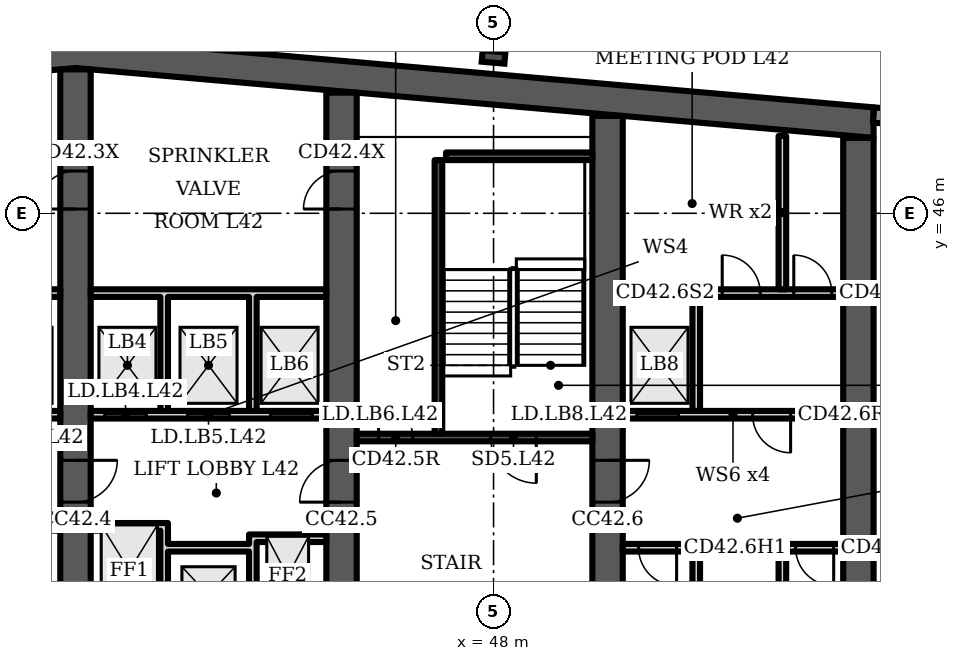
"""IFC4 building model, lengths in metres.
Left out: names, types, materials, properties, quantities, classifications, styles, units other than length and angle.
Written with IfcOpenShell. Run it as: python <this file> out.ifc"""

import sys

from ifc_helpers import new_model, si_unit, direction, frame, frame_2d, origin, origin_2d, place, context, subcontext, project, spatial, polyline, rectangle, i_section, outline, extrude, element, fill, save


model = new_model("IFC4")
c1 = context("Model", 3, precision=1e-05, world=origin(), true_north=direction((0.0, 1.0)))
c2 = subcontext(c1, "Body", "Model", "MODEL_VIEW")
j1 = project(units=[si_unit("LENGTHUNIT", "METRE"), si_unit("PLANEANGLEUNIT", "RADIAN")], contexts=[c1])
p1 = place(None, origin())
s1 = spatial("IfcSite", under=j1, at=p1, CompositionType="ELEMENT")
p2 = place(p1, origin())
s2 = spatial("IfcBuilding", under=s1, at=p2, CompositionType="ELEMENT")
p3 = place(p2, frame((0.0, 0.0, 173.5)))
s3 = spatial("IfcBuildingStorey", under=s2, at=p3, CompositionType="ELEMENT", Elevation=173.5)
p4 = place(p3, origin())
e1 = element("IfcWall", 1, at=p4, inside=s3, PredefinedType="SHEAR", context=c2, shape_type="SweptSolid", body=[
    extrude(outline(polyline([(16.0, 47.984), (37.0, 49.822), (58.0, 47.984), (58.0, 48.787), (37.0, 50.625), (16.0, 48.787), (16.0, 47.984)])), origin(), (0.0, 0.0, 1.0), 3.6),
])
p5 = place(p3, frame((37.0, 34.8, 0.0), z_axis=(0.0, 0.0, 1.0), x_axis=(0.0, 1.0, 0.0)))
e2 = element("IfcWall", 2, at=p5, inside=s3, PredefinedType="SHEAR", context=c2, shape_type="SweptSolid", body=[
    extrude(rectangle(XDim=14.987, YDim=0.8, at=frame_2d((7.493, 0.0))), origin(), (0.0, 0.0, 1.0), 3.6),
])
p6 = place(p5, frame((11.312, 0.0, 0.0)))
e3 = element("IfcOpeningElement", 3, at=p6, cuts=e2, PredefinedType="OPENING", context=c2, shape_type="SweptSolid", body=[
    extrude(rectangle(XDim=1.0, YDim=2.1, at=frame_2d((0.5, 1.05))), frame((0.0, 0.41, 0.0), z_axis=(0.0, -1.0, 0.0), x_axis=(1.0, 0.0, 0.0)), (0.0, 0.0, 1.0), 0.82),
])
p7 = place(p5, frame((3.6, 0.0, 0.0)))
e4 = element("IfcOpeningElement", 4, at=p7, cuts=e2, PredefinedType="OPENING", context=c2, shape_type="SweptSolid", body=[
    extrude(rectangle(XDim=1.1, YDim=2.1, at=frame_2d((0.55, 1.05))), frame((0.0, 0.41, 0.0), z_axis=(0.0, -1.0, 0.0), x_axis=(1.0, 0.0, 0.0)), (0.0, 0.0, 1.0), 0.82),
])
p8 = place(p3, frame((44.0, 34.8, 0.0), z_axis=(0.0, 0.0, 1.0), x_axis=(0.0, 1.0, 0.0)))
e5 = element("IfcWall", 5, at=p8, inside=s3, PredefinedType="SHEAR", context=c2, shape_type="SweptSolid", body=[
    extrude(rectangle(XDim=14.374, YDim=0.8, at=frame_2d((7.187, 0.0))), origin(), (0.0, 0.0, 1.0), 3.6),
])
p9 = place(p8, frame((11.312, 0.0, 0.0)))
e6 = element("IfcOpeningElement", 6, at=p9, cuts=e5, PredefinedType="OPENING", context=c2, shape_type="SweptSolid", body=[
    extrude(rectangle(XDim=1.0, YDim=2.1, at=frame_2d((0.5, 1.05))), frame((0.0, 0.41, 0.0), z_axis=(0.0, -1.0, 0.0), x_axis=(1.0, 0.0, 0.0)), (0.0, 0.0, 1.0), 0.82),
])
p10 = place(p8, frame((3.6, 0.0, 0.0)))
e7 = element("IfcOpeningElement", 7, at=p10, cuts=e5, PredefinedType="OPENING", context=c2, shape_type="SweptSolid", body=[
    extrude(rectangle(XDim=1.1, YDim=2.1, at=frame_2d((0.55, 1.05))), frame((0.0, 0.41, 0.0), z_axis=(0.0, -1.0, 0.0), x_axis=(1.0, 0.0, 0.0)), (0.0, 0.0, 1.0), 0.82),
])
p11 = place(p3, frame((51.0, 34.8, 0.0), z_axis=(0.0, 0.0, 1.0), x_axis=(0.0, 1.0, 0.0)))
e8 = element("IfcWall", 8, at=p11, inside=s3, PredefinedType="SHEAR", context=c2, shape_type="SweptSolid", body=[
    extrude(rectangle(XDim=13.762, YDim=0.8, at=frame_2d((6.881, 0.0))), origin(), (0.0, 0.0, 1.0), 3.6),
])
p12 = place(p11, frame((3.6, 0.0, 0.0)))
e9 = element("IfcOpeningElement", 9, at=p12, cuts=e8, PredefinedType="OPENING", context=c2, shape_type="SweptSolid", body=[
    extrude(rectangle(XDim=1.1, YDim=2.1, at=frame_2d((0.55, 1.05))), frame((0.0, 0.41, 0.0), z_axis=(0.0, -1.0, 0.0), x_axis=(1.0, 0.0, 0.0)), (0.0, 0.0, 1.0), 0.82),
])
p13 = place(p3, frame((57.6, 34.8, 0.0), z_axis=(0.0, 0.0, 1.0), x_axis=(0.0, 1.0, 0.0)))
e10 = element("IfcWall", 10, at=p13, inside=s3, PredefinedType="SHEAR", context=c2, shape_type="SweptSolid", body=[
    extrude(rectangle(XDim=13.184, YDim=0.8, at=frame_2d((6.592, 0.0))), origin(), (0.0, 0.0, 1.0), 3.6),
])
p14 = place(p3, frame((48.0, 50.112, 0.0), z_axis=(0.0, 0.0, 1.0), x_axis=(0.087156, 0.996198, 0.0)))
e11 = element("IfcColumn", 11, at=p14, inside=s3, PredefinedType="COLUMN", context=c2, shape_type="SweptSolid", body=[
    extrude(i_section(OverallWidth=0.3, OverallDepth=0.6, WebThickness=0.015, FlangeThickness=0.03, FilletRadius=0.027, at=origin_2d()), origin(), (0.0, 0.0, 1.0), 3.6),
])
p15 = place(p3, frame((60.983, 48.326, 0.0), z_axis=(0.0, 0.0, 1.0), x_axis=(-0.996194, 0.087168, 0.0)))
e12 = element("IfcWall", 12, at=p15, inside=s3, PredefinedType="SOLIDWALL", context=c2, shape_type="SweptSolid", body=[
    extrude(rectangle(XDim=2.994, YDim=0.4, at=frame_2d((1.497, 0.0))), origin(), (0.0, 0.0, 1.0), 3.2),
])
p16 = place(p3, frame((30.4, 40.7, 0.0), z_axis=(0.0, 0.0, 1.0), x_axis=(1.0, 0.0, 0.0)))
e13 = element("IfcWall", 13, at=p16, inside=s3, PredefinedType="PARTITIONING", context=c2, shape_type="SweptSolid", body=[
    extrude(rectangle(XDim=6.2, YDim=0.2, at=frame_2d((3.1, 0.0))), origin(), (0.0, 0.0, 1.0), 3.2),
])
p17 = place(p16, frame((0.367, 0.0, 0.0)))
e14 = element("IfcOpeningElement", 14, at=p17, cuts=e13, PredefinedType="OPENING", context=c2, shape_type="SweptSolid", body=[
    extrude(rectangle(XDim=1.1, YDim=2.1, at=frame_2d((0.55, 1.05))), frame((0.0, 0.11, 0.0), z_axis=(0.0, -1.0, 0.0), x_axis=(1.0, 0.0, 0.0)), (0.0, 0.0, 1.0), 0.22),
])
p18 = place(p16, frame((2.55, 0.0, 0.0)))
e15 = element("IfcOpeningElement", 15, at=p18, cuts=e13, PredefinedType="OPENING", context=c2, shape_type="SweptSolid", body=[
    extrude(rectangle(XDim=1.1, YDim=2.1, at=frame_2d((0.55, 1.05))), frame((0.0, 0.11, 0.0), z_axis=(0.0, -1.0, 0.0), x_axis=(1.0, 0.0, 0.0)), (0.0, 0.0, 1.0), 0.22),
])
p19 = place(p16, frame((4.733, 0.0, 0.0)))
e16 = element("IfcOpeningElement", 16, at=p19, cuts=e13, PredefinedType="OPENING", context=c2, shape_type="SweptSolid", body=[
    extrude(rectangle(XDim=1.1, YDim=2.1, at=frame_2d((0.55, 1.05))), frame((0.0, 0.11, 0.0), z_axis=(0.0, -1.0, 0.0), x_axis=(1.0, 0.0, 0.0)), (0.0, 0.0, 1.0), 0.22),
])
p20 = place(p3, frame((0.0, 0.0, -0.0)))
e17 = element("IfcWall", 17, at=p20, inside=s3, PredefinedType="PARTITIONING", context=c2, shape_type="SweptSolid", body=[
    extrude(outline(polyline([(34.567, 37.85), (34.767, 37.85), (36.6, 37.85), (36.6, 37.65), (34.767, 37.65), (34.767, 34.8), (34.567, 34.8), (34.567, 37.85)])), origin(), (0.0, 0.0, 1.0), 3.2),
])
p21 = place(p3, frame((0.0, 0.0, -0.0)))
e18 = element("IfcWall", 18, at=p21, inside=s3, PredefinedType="PARTITIONING", context=c2, shape_type="SweptSolid", body=[
    extrude(outline(polyline([(32.433, 40.8), (32.233, 40.8), (32.233, 43.8), (30.4, 43.8), (30.4, 44.0), (36.6, 44.0), (36.6, 43.8), (34.767, 43.8), (34.767, 40.8), (34.567, 40.8), (34.567, 43.8), (32.433, 43.8), (32.433, 40.8)])), origin(), (0.0, 0.0, 1.0), 3.2),
])
p22 = place(p3, frame((37.4, 40.7, 0.0), z_axis=(0.0, 0.0, 1.0), x_axis=(1.0, 0.0, 0.0)))
e19 = element("IfcWall", 19, at=p22, inside=s3, PredefinedType="PARTITIONING", context=c2, shape_type="SweptSolid", body=[
    extrude(rectangle(XDim=6.2, YDim=0.2, at=frame_2d((3.1, 0.0))), origin(), (0.0, 0.0, 1.0), 3.2),
])
p23 = place(p22, frame((0.367, 0.0, 0.0)))
e20 = element("IfcOpeningElement", 20, at=p23, cuts=e19, PredefinedType="OPENING", context=c2, shape_type="SweptSolid", body=[
    extrude(rectangle(XDim=1.1, YDim=2.1, at=frame_2d((0.55, 1.05))), frame((0.0, 0.11, 0.0), z_axis=(0.0, -1.0, 0.0), x_axis=(1.0, 0.0, 0.0)), (0.0, 0.0, 1.0), 0.22),
])
p24 = place(p22, frame((2.55, 0.0, 0.0)))
e21 = element("IfcOpeningElement", 21, at=p24, cuts=e19, PredefinedType="OPENING", context=c2, shape_type="SweptSolid", body=[
    extrude(rectangle(XDim=1.1, YDim=2.1, at=frame_2d((0.55, 1.05))), frame((0.0, 0.11, 0.0), z_axis=(0.0, -1.0, 0.0), x_axis=(1.0, 0.0, 0.0)), (0.0, 0.0, 1.0), 0.22),
])
p25 = place(p22, frame((4.733, 0.0, 0.0)))
e22 = element("IfcOpeningElement", 22, at=p25, cuts=e19, PredefinedType="OPENING", context=c2, shape_type="SweptSolid", body=[
    extrude(rectangle(XDim=1.1, YDim=2.1, at=frame_2d((0.55, 1.05))), frame((0.0, 0.11, 0.0), z_axis=(0.0, -1.0, 0.0), x_axis=(1.0, 0.0, 0.0)), (0.0, 0.0, 1.0), 0.22),
])
p26 = place(p3, frame((0.0, 0.0, -0.0)))
e23 = element("IfcWall", 23, at=p26, inside=s3, PredefinedType="PARTITIONING", context=c2, shape_type="SweptSolid", body=[
    extrude(outline(polyline([(41.567, 37.1), (39.433, 37.1), (39.433, 34.8), (39.233, 34.8), (39.233, 37.65), (37.4, 37.65), (37.4, 37.85), (39.233, 37.85), (39.433, 37.85), (39.433, 37.3), (41.567, 37.3), (41.567, 37.55), (41.767, 37.55), (43.6, 37.55), (43.6, 37.35), (41.767, 37.35), (41.767, 34.8), (41.567, 34.8), (41.567, 37.1)])), origin(), (0.0, 0.0, 1.0), 3.2),
])
p27 = place(p3, frame((0.0, 0.0, -0.0)))
e24 = element("IfcWall", 24, at=p27, inside=s3, PredefinedType="PARTITIONING", context=c2, shape_type="SweptSolid", body=[
    extrude(outline(polyline([(39.433, 40.8), (39.233, 40.8), (39.233, 43.8), (37.4, 43.8), (37.4, 44.0), (43.6, 44.0), (43.6, 43.8), (41.767, 43.8), (41.767, 40.8), (41.567, 40.8), (41.567, 43.8), (39.433, 43.8), (39.433, 40.8)])), origin(), (0.0, 0.0, 1.0), 3.2),
])
p28 = place(p3, frame((44.4, 40.1, 0.0), z_axis=(0.0, 0.0, 1.0), x_axis=(1.0, 0.0, 0.0)))
e25 = element("IfcWall", 25, at=p28, inside=s3, PredefinedType="SHEAR", context=c2, shape_type="SweptSolid", body=[
    extrude(rectangle(XDim=6.2, YDim=0.2, at=frame_2d((3.1, 0.0))), origin(), (0.0, 0.0, 1.0), 3.2),
])
p29 = place(p28, frame((3.525, 0.0, 0.0)))
e26 = element("IfcOpeningElement", 26, at=p29, cuts=e25, PredefinedType="OPENING", context=c2, shape_type="SweptSolid", body=[
    extrude(rectangle(XDim=1.2, YDim=2.1, at=frame_2d((0.6, 1.05))), frame((0.0, 0.11, 0.0), z_axis=(0.0, -1.0, 0.0), x_axis=(1.0, 0.0, 0.0)), (0.0, 0.0, 1.0), 0.22),
])
p30 = place(p28, frame((0.575, 0.0, 0.0)))
e27 = element("IfcOpeningElement", 27, at=p30, cuts=e25, PredefinedType="OPENING", context=c2, shape_type="SweptSolid", body=[
    extrude(rectangle(XDim=0.9, YDim=2.1, at=frame_2d((0.45, 1.05))), frame((0.0, 0.11, 0.0), z_axis=(0.0, -1.0, 0.0), x_axis=(1.0, 0.0, 0.0)), (0.0, 0.0, 1.0), 0.22),
])
p31 = place(p3, frame((46.55, 40.2, 0.0), z_axis=(0.0, 0.0, 1.0), x_axis=(0.0, 1.0, 0.0)))
e28 = element("IfcWall", 28, at=p31, inside=s3, PredefinedType="SHEAR", context=c2, shape_type="SweptSolid", body=[
    extrude(rectangle(XDim=7.2, YDim=0.2, at=frame_2d((3.6, 0.0))), origin(), (0.0, 0.0, 1.0), 3.2),
])
p32 = place(p3, frame((46.75, 47.5, 0.0), z_axis=(0.0, 0.0, 1.0), x_axis=(1.0, 0.0, 0.0)))
e29 = element("IfcWall", 29, at=p32, inside=s3, PredefinedType="SHEAR", context=c2, shape_type="SweptSolid", body=[
    extrude(rectangle(XDim=3.85, YDim=0.2, at=frame_2d((1.925, 0.0))), origin(), (0.0, 0.0, 1.0), 3.2),
])
p33 = place(p3, frame((51.4, 37.2, 0.0), z_axis=(0.0, 0.0, 1.0), x_axis=(1.0, 0.0, 0.0)))
e30 = element("IfcWall", 30, at=p33, inside=s3, PredefinedType="PARTITIONING", context=c2, shape_type="SweptSolid", body=[
    extrude(rectangle(XDim=1.833, YDim=0.2, at=frame_2d((0.917, 0.0))), origin(), (0.0, 0.0, 1.0), 3.2),
])
p34 = place(p33, frame((0.417, 0.0, 0.0)))
e31 = element("IfcOpeningElement", 31, at=p34, cuts=e30, PredefinedType="OPENING", context=c2, shape_type="SweptSolid", body=[
    extrude(rectangle(XDim=1.0, YDim=2.1, at=frame_2d((0.5, 1.05))), frame((0.0, 0.11, 0.0), z_axis=(0.0, -1.0, 0.0), x_axis=(1.0, 0.0, 0.0)), (0.0, 0.0, 1.0), 0.22),
])
p35 = place(p3, frame((55.7, 37.2, 0.0), z_axis=(0.0, 0.0, 1.0), x_axis=(1.0, 0.0, 0.0)))
e32 = element("IfcWall", 32, at=p35, inside=s3, PredefinedType="PARTITIONING", context=c2, shape_type="SweptSolid", body=[
    extrude(rectangle(XDim=1.5, YDim=0.2, at=frame_2d((0.75, 0.0))), origin(), (0.0, 0.0, 1.0), 3.2),
])
p36 = place(p35, frame((0.25, 0.0, 0.0)))
e33 = element("IfcOpeningElement", 33, at=p36, cuts=e32, PredefinedType="OPENING", context=c2, shape_type="SweptSolid", body=[
    extrude(rectangle(XDim=1.0, YDim=2.1, at=frame_2d((0.5, 1.05))), frame((0.0, 0.11, 0.0), z_axis=(0.0, -1.0, 0.0), x_axis=(1.0, 0.0, 0.0)), (0.0, 0.0, 1.0), 0.22),
])
p37 = place(p3, frame((51.4, 40.7, 0.0), z_axis=(0.0, 0.0, 1.0), x_axis=(1.0, 0.0, 0.0)))
e34 = element("IfcWall", 34, at=p37, inside=s3, PredefinedType="PARTITIONING", context=c2, shape_type="SweptSolid", body=[
    extrude(rectangle(XDim=5.8, YDim=0.2, at=frame_2d((2.9, 0.0))), origin(), (0.0, 0.0, 1.0), 3.2),
])
p38 = place(p37, frame((0.367, 0.0, 0.0)))
e35 = element("IfcOpeningElement", 35, at=p38, cuts=e34, PredefinedType="OPENING", context=c2, shape_type="SweptSolid", body=[
    extrude(rectangle(XDim=1.1, YDim=2.1, at=frame_2d((0.55, 1.05))), frame((0.0, 0.11, 0.0), z_axis=(0.0, -1.0, 0.0), x_axis=(1.0, 0.0, 0.0)), (0.0, 0.0, 1.0), 0.22),
])
p39 = place(p37, frame((3.417, 0.0, 0.0)))
e36 = element("IfcOpeningElement", 36, at=p39, cuts=e34, PredefinedType="OPENING", context=c2, shape_type="SweptSolid", body=[
    extrude(rectangle(XDim=1.0, YDim=2.1, at=frame_2d((0.5, 1.05))), frame((0.0, 0.11, 0.0), z_axis=(0.0, -1.0, 0.0), x_axis=(1.0, 0.0, 0.0)), (0.0, 0.0, 1.0), 0.22),
])
p40 = place(p3, frame((51.4, 43.9, 0.0), z_axis=(0.0, 0.0, 1.0), x_axis=(1.0, 0.0, 0.0)))
e37 = element("IfcWall", 37, at=p40, inside=s3, PredefinedType="PARTITIONING", context=c2, shape_type="SweptSolid", body=[
    extrude(rectangle(XDim=5.8, YDim=0.2, at=frame_2d((2.9, 0.0))), origin(), (0.0, 0.0, 1.0), 3.2),
])
p41 = place(p40, frame((2.617, 0.0, 0.0)))
e38 = element("IfcOpeningElement", 38, at=p41, cuts=e37, PredefinedType="OPENING", context=c2, shape_type="SweptSolid", body=[
    extrude(rectangle(XDim=1.0, YDim=2.1, at=frame_2d((0.5, 1.05))), frame((0.0, 0.11, 0.0), z_axis=(0.0, -1.0, 0.0), x_axis=(1.0, 0.0, 0.0)), (0.0, 0.0, 1.0), 0.22),
])
p42 = place(p40, frame((4.5, 0.0, 0.0)))
e39 = element("IfcOpeningElement", 39, at=p42, cuts=e37, PredefinedType="OPENING", context=c2, shape_type="SweptSolid", body=[
    extrude(rectangle(XDim=1.0, YDim=2.1, at=frame_2d((0.5, 1.05))), frame((0.0, 0.11, 0.0), z_axis=(0.0, -1.0, 0.0), x_axis=(1.0, 0.0, 0.0)), (0.0, 0.0, 1.0), 0.22),
])
p43 = place(p3, frame((0.0, 0.0, -0.0)))
e40 = element("IfcWall", 40, at=p43, inside=s3, PredefinedType="PARTITIONING", context=c2, shape_type="SweptSolid", body=[
    extrude(outline(polyline([(53.233, 34.8), (53.233, 37.3), (53.433, 37.3), (53.433, 34.8), (53.233, 34.8)])), origin(), (0.0, 0.0, 1.0), 3.2),
])
p44 = place(p3, frame((0.0, 0.0, -0.0)))
e41 = element("IfcWall", 41, at=p44, inside=s3, PredefinedType="PARTITIONING", context=c2, shape_type="SweptSolid", body=[
    extrude(outline(polyline([(55.5, 34.8), (55.5, 37.3), (55.7, 37.3), (55.7, 34.8), (55.5, 34.8)])), origin(), (0.0, 0.0, 1.0), 3.2),
])
p45 = place(p3, frame((0.0, 0.0, -0.0)))
e42 = element("IfcWall", 42, at=p45, inside=s3, PredefinedType="PARTITIONING", context=c2, shape_type="SweptSolid", body=[
    extrude(outline(polyline([(53.433, 40.8), (53.433, 43.8), (53.233, 43.8), (53.233, 40.8), (53.433, 40.8)])), origin(), (0.0, 0.0, 1.0), 3.2),
])
p46 = place(p3, frame((55.6, 44.0, 0.0), z_axis=(0.0, 0.0, 1.0), x_axis=(0.0, 1.0, 0.0)))
e43 = element("IfcWall", 43, at=p46, inside=s3, PredefinedType="PARTITIONING", context=c2, shape_type="SweptSolid", body=[
    extrude(rectangle(XDim=4.034, YDim=0.2, at=frame_2d((2.017, 0.0))), origin(), (0.0, 0.0, 1.0), 3.2),
])
p47 = place(p6, origin())
e44 = element("IfcDoor", 44, at=p47, inside=s3, OperationType="SINGLE_SWING_LEFT", PredefinedType="DOOR", context=c2, shape_type="SweptSolid", body=[
    extrude(rectangle(XDim=1.0, YDim=2.1, at=frame_2d((0.5, 1.05))), frame((0.0, 0.4, 0.0), z_axis=(0.0, -1.0, 0.0), x_axis=(1.0, 0.0, 0.0)), (0.0, 0.0, 1.0), 0.8),
])
fill(e3, e44)
p48 = place(p23, origin())
e45 = element("IfcDoor", 45, at=p48, inside=s3, OperationType="DOUBLE_DOOR_SLIDING", PredefinedType="DOOR", context=c2, shape_type="SweptSolid", body=[
    extrude(rectangle(XDim=1.1, YDim=2.1, at=frame_2d((0.55, 1.05))), frame((0.0, 0.025, 0.0), z_axis=(0.0, -1.0, 0.0), x_axis=(1.0, 0.0, 0.0)), (0.0, 0.0, 1.0), 0.05),
])
fill(e20, e45)
p49 = place(p24, origin())
e46 = element("IfcDoor", 46, at=p49, inside=s3, OperationType="DOUBLE_DOOR_SLIDING", PredefinedType="DOOR", context=c2, shape_type="SweptSolid", body=[
    extrude(rectangle(XDim=1.1, YDim=2.1, at=frame_2d((0.55, 1.05))), frame((0.0, 0.025, 0.0), z_axis=(0.0, -1.0, 0.0), x_axis=(1.0, 0.0, 0.0)), (0.0, 0.0, 1.0), 0.05),
])
fill(e21, e46)
p50 = place(p25, origin())
e47 = element("IfcDoor", 47, at=p50, inside=s3, OperationType="DOUBLE_DOOR_SLIDING", PredefinedType="DOOR", context=c2, shape_type="SweptSolid", body=[
    extrude(rectangle(XDim=1.1, YDim=2.1, at=frame_2d((0.55, 1.05))), frame((0.0, 0.025, 0.0), z_axis=(0.0, -1.0, 0.0), x_axis=(1.0, 0.0, 0.0)), (0.0, 0.0, 1.0), 0.05),
])
fill(e22, e47)
p51 = place(p9, origin())
e48 = element("IfcDoor", 48, at=p51, inside=s3, OperationType="SINGLE_SWING_LEFT", PredefinedType="DOOR", context=c2, shape_type="SweptSolid", body=[
    extrude(rectangle(XDim=1.0, YDim=2.1, at=frame_2d((0.5, 1.05))), frame((0.0, 0.4, 0.0), z_axis=(0.0, -1.0, 0.0), x_axis=(1.0, 0.0, 0.0)), (0.0, 0.0, 1.0), 0.8),
])
fill(e6, e48)
p52 = place(p29, origin())
e49 = element("IfcDoor", 49, at=p52, inside=s3, OperationType="SINGLE_SWING_RIGHT", PredefinedType="DOOR", context=c2, shape_type="SweptSolid", body=[
    extrude(rectangle(XDim=1.2, YDim=2.1, at=frame_2d((0.6, 1.05))), frame((0.0, 0.025, 0.0), z_axis=(0.0, -1.0, 0.0), x_axis=(1.0, 0.0, 0.0)), (0.0, 0.0, 1.0), 0.05),
])
fill(e26, e49)
p53 = place(p30, origin())
e50 = element("IfcDoor", 50, at=p53, inside=s3, OperationType="SINGLE_SWING_LEFT", PredefinedType="DOOR", context=c2, shape_type="SweptSolid", body=[
    extrude(rectangle(XDim=0.9, YDim=2.1, at=frame_2d((0.45, 1.05))), frame((0.0, 0.025, 0.0), z_axis=(0.0, -1.0, 0.0), x_axis=(1.0, 0.0, 0.0)), (0.0, 0.0, 1.0), 0.05),
])
fill(e27, e50)
p54 = place(p34, origin())
e51 = element("IfcDoor", 51, at=p54, inside=s3, OperationType="SINGLE_SWING_RIGHT", PredefinedType="DOOR", context=c2, shape_type="SweptSolid", body=[
    extrude(rectangle(XDim=1.0, YDim=2.1, at=frame_2d((0.5, 1.05))), frame((0.0, 0.025, 0.0), z_axis=(0.0, -1.0, 0.0), x_axis=(1.0, 0.0, 0.0)), (0.0, 0.0, 1.0), 0.05),
])
fill(e31, e51)
p55 = place(p36, origin())
e52 = element("IfcDoor", 52, at=p55, inside=s3, OperationType="SINGLE_SWING_RIGHT", PredefinedType="DOOR", context=c2, shape_type="SweptSolid", body=[
    extrude(rectangle(XDim=1.0, YDim=2.1, at=frame_2d((0.5, 1.05))), frame((0.0, 0.025, 0.0), z_axis=(0.0, -1.0, 0.0), x_axis=(1.0, 0.0, 0.0)), (0.0, 0.0, 1.0), 0.05),
])
fill(e33, e52)
p56 = place(p38, origin())
e53 = element("IfcDoor", 53, at=p56, inside=s3, OperationType="DOUBLE_DOOR_SLIDING", PredefinedType="DOOR", context=c2, shape_type="SweptSolid", body=[
    extrude(rectangle(XDim=1.1, YDim=2.1, at=frame_2d((0.55, 1.05))), frame((0.0, 0.025, 0.0), z_axis=(0.0, -1.0, 0.0), x_axis=(1.0, 0.0, 0.0)), (0.0, 0.0, 1.0), 0.05),
])
fill(e35, e53)
p57 = place(p39, origin())
e54 = element("IfcDoor", 54, at=p57, inside=s3, OperationType="SINGLE_SWING_RIGHT", PredefinedType="DOOR", context=c2, shape_type="SweptSolid", body=[
    extrude(rectangle(XDim=1.0, YDim=2.1, at=frame_2d((0.5, 1.05))), frame((0.0, 0.025, 0.0), z_axis=(0.0, -1.0, 0.0), x_axis=(1.0, 0.0, 0.0)), (0.0, 0.0, 1.0), 0.05),
])
fill(e36, e54)
p58 = place(p41, origin())
e55 = element("IfcDoor", 55, at=p58, inside=s3, OperationType="SINGLE_SWING_LEFT", PredefinedType="DOOR", context=c2, shape_type="SweptSolid", body=[
    extrude(rectangle(XDim=1.0, YDim=2.1, at=frame_2d((0.5, 1.05))), frame((0.0, 0.025, 0.0), z_axis=(0.0, -1.0, 0.0), x_axis=(1.0, 0.0, 0.0)), (0.0, 0.0, 1.0), 0.05),
])
fill(e38, e55)
p59 = place(p42, origin())
e56 = element("IfcDoor", 56, at=p59, inside=s3, OperationType="SINGLE_SWING_LEFT", PredefinedType="DOOR", context=c2, shape_type="SweptSolid", body=[
    extrude(rectangle(XDim=1.0, YDim=2.1, at=frame_2d((0.5, 1.05))), frame((0.0, 0.025, 0.0), z_axis=(0.0, -1.0, 0.0), x_axis=(1.0, 0.0, 0.0)), (0.0, 0.0, 1.0), 0.05),
])
fill(e39, e56)
p60 = place(p7, origin())
e57 = element("IfcDoor", 57, at=p60, inside=s3, OperationType="SINGLE_SWING_RIGHT", PredefinedType="DOOR", context=c2, shape_type="SweptSolid", body=[
    extrude(rectangle(XDim=1.1, YDim=2.1, at=frame_2d((0.55, 1.05))), frame((0.0, 0.025, 0.0), z_axis=(0.0, -1.0, 0.0), x_axis=(1.0, 0.0, 0.0)), (0.0, 0.0, 1.0), 0.05),
])
fill(e4, e57)
p61 = place(p10, origin())
e58 = element("IfcDoor", 58, at=p61, inside=s3, OperationType="SINGLE_SWING_LEFT", PredefinedType="DOOR", context=c2, shape_type="SweptSolid", body=[
    extrude(rectangle(XDim=1.1, YDim=2.1, at=frame_2d((0.55, 1.05))), frame((0.0, 0.025, 0.0), z_axis=(0.0, -1.0, 0.0), x_axis=(1.0, 0.0, 0.0)), (0.0, 0.0, 1.0), 0.05),
])
fill(e7, e58)
p62 = place(p12, origin())
e59 = element("IfcDoor", 59, at=p62, inside=s3, OperationType="SINGLE_SWING_RIGHT", PredefinedType="DOOR", context=c2, shape_type="SweptSolid", body=[
    extrude(rectangle(XDim=1.1, YDim=2.1, at=frame_2d((0.55, 1.05))), frame((0.0, 0.025, 0.0), z_axis=(0.0, -1.0, 0.0), x_axis=(1.0, 0.0, 0.0)), (0.0, 0.0, 1.0), 0.05),
])
fill(e9, e59)
save(model, sys.argv[1])
